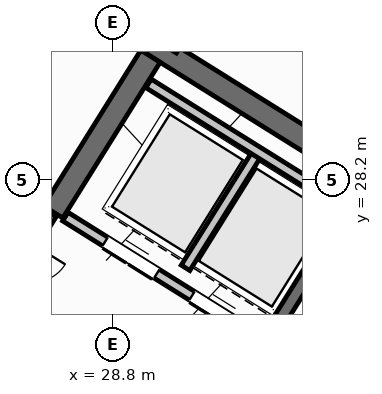
"""IFC4 building model, lengths in metres.
Left out: names, types, materials, properties, quantities, classifications, styles, units other than length and angle.
Written with IfcOpenShell. Run it as: python <this file> out.ifc"""

import sys

from ifc_helpers import new_model, si_unit, direction, frame, frame_2d, origin, origin_2d, place, context, subcontext, project, spatial, rectangle, hollow_rectangle, extrude, source, transform, mapped, element, fill, save


model = new_model("IFC4")
c1 = context("Model", 3, precision=1e-05, world=origin(), true_north=direction((0.0, 1.0)))
c2 = subcontext(c1, "Body", "Model", "MODEL_VIEW")
j1 = project(units=[si_unit("LENGTHUNIT", "METRE"), si_unit("PLANEANGLEUNIT", "RADIAN")], contexts=[c1])
p1 = place(None, origin())
s1 = spatial("IfcSite", under=j1, at=p1, CompositionType="ELEMENT")
p2 = place(p1, origin())
s2 = spatial("IfcBuilding", under=s1, at=p2, CompositionType="ELEMENT")
p3 = place(p2, frame((0.0, 0.0, 225.6)))
s3 = spatial("IfcBuildingStorey", under=s2, at=p3, CompositionType="ELEMENT", Elevation=225.6)
p4 = place(p3, frame((40.531, 24.036, 0.0), z_axis=(0.0, 0.0, 1.0), x_axis=(-0.848048787466, 0.529918157905, 0.0)))
e1 = element("IfcWall", 1, at=p4, inside=s3, PredefinedType="SHEAR", context=c2, shape_type="SweptSolid", body=[
    extrude(rectangle(XDim=13.04, YDim=0.45, at=frame_2d((6.52, 0.0))), origin(), (0.0, 0.0, 1.0), 3.35),
])
p5 = place(p3, frame((29.544, 30.636, 0.0), z_axis=(0.0, 0.0, 1.0), x_axis=(-0.529902075036, -0.848058836916, 0.0)))
e2 = element("IfcWall", 2, at=p5, inside=s3, PredefinedType="SHEAR", context=c2, shape_type="SweptSolid", body=[
    extrude(rectangle(XDim=3.625, YDim=0.45, at=frame_2d((1.812, 0.0))), origin(), (0.0, 0.0, 1.0), 3.35),
])
m1 = source(origin(), c2, "Body", "SweptSolid", [
    extrude(hollow_rectangle(XDim=0.8, YDim=0.8, WallThickness=0.032, at=origin_2d()), origin(), (0.0, 0.0, 1.0), 3.6),
])
p6 = place(p3, frame((29.928, 31.251, 0.0), z_axis=(0.0, 0.0, 1.0), x_axis=(-0.848048096156, 0.529919264233, 0.0)))
e3 = element("IfcColumn", 3, at=p6, inside=s3, PredefinedType="COLUMN", context=c2, shape_type="MappedRepresentation", body=[
    mapped(m1, transform((0.0, 0.0, 0.0), scale=1.0)),
])
p7 = place(p3, frame((31.76, 12.183, 0.0), z_axis=(0.0, 0.0, 1.0), x_axis=(-0.848047074256, 0.529920899612, 0.0)))
e4 = element("IfcWall", 4, at=p7, inside=s3, PredefinedType="STANDARD", context=c2, shape_type="SweptSolid", body=[
    extrude(rectangle(XDim=30.652, YDim=0.32, at=frame_2d((15.326, 0.0))), origin(), (0.0, 0.0, 1.0), 3.35),
])
p8 = place(p7, frame((15.166, 0.0, 0.0)))
e5 = element("IfcOpeningElement", 5, at=p8, cuts=e4, PredefinedType="OPENING", context=c2, shape_type="SweptSolid", body=[
    extrude(rectangle(XDim=1.2, YDim=2.15, at=frame_2d((0.6, 1.075))), frame((0.0, 0.17, 0.0), z_axis=(0.0, -1.0, 0.0), x_axis=(1.0, 0.0, 0.0)), (0.0, 0.0, 1.0), 0.34),
])
p9 = place(p7, frame((2.24, 0.0, 0.9)))
e6 = element("IfcOpeningElement", 6, at=p9, cuts=e4, PredefinedType="OPENING", context=c2, shape_type="SweptSolid", body=[
    extrude(rectangle(XDim=1.65, YDim=1.45, at=frame_2d((0.825, 0.725))), frame((0.0, 0.17, 0.0), z_axis=(0.0, -1.0, 0.0), x_axis=(1.0, 0.0, 0.0)), (0.0, 0.0, 1.0), 0.34),
])
p10 = place(p7, frame((7.469, 0.0, 0.9)))
e7 = element("IfcOpeningElement", 7, at=p10, cuts=e4, PredefinedType="OPENING", context=c2, shape_type="SweptSolid", body=[
    extrude(rectangle(XDim=1.65, YDim=1.45, at=frame_2d((0.825, 0.725))), frame((0.0, 0.17, 0.0), z_axis=(0.0, -1.0, 0.0), x_axis=(1.0, 0.0, 0.0)), (0.0, 0.0, 1.0), 0.34),
])
p11 = place(p7, frame((12.623, 0.0, 1.0)))
e8 = element("IfcOpeningElement", 8, at=p11, cuts=e4, PredefinedType="OPENING", context=c2, shape_type="SweptSolid", body=[
    extrude(rectangle(XDim=0.9, YDim=1.25, at=frame_2d((0.45, 0.625))), frame((0.0, 0.17, 0.0), z_axis=(0.0, -1.0, 0.0), x_axis=(1.0, 0.0, 0.0)), (0.0, 0.0, 1.0), 0.34),
])
p12 = place(p7, frame((19.556, 0.0, 1.0)))
e9 = element("IfcOpeningElement", 9, at=p12, cuts=e4, PredefinedType="OPENING", context=c2, shape_type="SweptSolid", body=[
    extrude(rectangle(XDim=0.9, YDim=1.25, at=frame_2d((0.45, 0.625))), frame((0.0, 0.17, 0.0), z_axis=(0.0, -1.0, 0.0), x_axis=(1.0, 0.0, 0.0)), (0.0, 0.0, 1.0), 0.34),
])
p13 = place(p7, frame((21.95, 0.0, 1.0)))
e10 = element("IfcOpeningElement", 10, at=p13, cuts=e4, PredefinedType="OPENING", context=c2, shape_type="SweptSolid", body=[
    extrude(rectangle(XDim=0.9, YDim=1.25, at=frame_2d((0.45, 0.625))), frame((0.0, 0.17, 0.0), z_axis=(0.0, -1.0, 0.0), x_axis=(1.0, 0.0, 0.0)), (0.0, 0.0, 1.0), 0.34),
])
p14 = place(p7, frame((26.983, 0.0, 0.9)))
e11 = element("IfcOpeningElement", 11, at=p14, cuts=e4, PredefinedType="OPENING", context=c2, shape_type="SweptSolid", body=[
    extrude(rectangle(XDim=1.35, YDim=1.45, at=frame_2d((0.675, 0.725))), frame((0.0, 0.17, 0.0), z_axis=(0.0, -1.0, 0.0), x_axis=(1.0, 0.0, 0.0)), (0.0, 0.0, 1.0), 0.34),
])
p15 = place(p3, frame((33.496, 27.677, 0.0), z_axis=(0.0, 0.0, 1.0), x_axis=(-0.529908658664, -0.84805472316, 0.0)))
e12 = element("IfcWall", 12, at=p15, inside=s3, PredefinedType="SHEAR", context=c2, shape_type="SweptSolid", body=[
    extrude(rectangle(XDim=3.16, YDim=0.26, at=frame_2d((1.58, 0.0))), origin(), (0.0, 0.0, 1.0), 3.35),
])
p16 = place(p3, frame((31.822, 24.998, 0.0), z_axis=(0.0, 0.0, 1.0), x_axis=(-0.848054125777, 0.529909614701, 0.0)))
e13 = element("IfcWall", 13, at=p16, inside=s3, PredefinedType="STANDARD", context=c2, shape_type="SweptSolid", body=[
    extrude(rectangle(XDim=4.668, YDim=0.2, at=frame_2d((2.334, 0.0))), origin(), (0.0, 0.0, 1.0), 3.34),
])
p17 = place(p16, frame((0.52, 0.0, 0.0)))
e14 = element("IfcOpeningElement", 14, at=p17, cuts=e13, PredefinedType="OPENING", context=c2, shape_type="SweptSolid", body=[
    extrude(rectangle(XDim=1.2, YDim=2.15, at=frame_2d((0.6, 1.075))), frame((0.0, 0.11, 0.0), z_axis=(0.0, -1.0, 0.0), x_axis=(1.0, 0.0, 0.0)), (0.0, 0.0, 1.0), 0.22),
])
p18 = place(p16, frame((2.54, 0.0, 0.0)))
e15 = element("IfcOpeningElement", 15, at=p18, cuts=e13, PredefinedType="OPENING", context=c2, shape_type="SweptSolid", body=[
    extrude(rectangle(XDim=1.2, YDim=2.15, at=frame_2d((0.6, 1.075))), frame((0.0, 0.11, 0.0), z_axis=(0.0, -1.0, 0.0), x_axis=(1.0, 0.0, 0.0)), (0.0, 0.0, 1.0), 0.22),
])
p19 = place(p3, frame((31.645, 28.716, 0.0), z_axis=(0.0, 0.0, 1.0), x_axis=(-0.52986693015, -0.848080795876, 0.0)))
e16 = element("IfcWall", 16, at=p19, inside=s3, PredefinedType="STANDARD", context=c2, shape_type="SweptSolid", body=[
    extrude(rectangle(XDim=2.66, YDim=0.2, at=frame_2d((1.33, 0.0))), origin(), (0.0, 0.0, 1.0), 3.34),
])
p20 = place(p3, frame((33.363, 27.69, 0.0), z_axis=(0.0, 0.0, 1.0), x_axis=(-0.84804957148, 0.529916903215, 0.0)))
e17 = element("IfcWall", 17, at=p20, inside=s3, PredefinedType="STANDARD", context=c2, shape_type="SweptSolid", body=[
    extrude(rectangle(XDim=4.548, YDim=0.2, at=frame_2d((2.274, 0.0))), origin(), (0.0, 0.0, 1.0), 3.34),
])
p21 = place(p3, frame((27.596, 27.52, 0.0), z_axis=(0.0, 0.0, 1.0), x_axis=(-0.529865479138, -0.848081702443, 0.0)))
e18 = element("IfcWall", 18, at=p21, inside=s3, PredefinedType="STANDARD", context=c2, shape_type="SweptSolid", body=[
    extrude(rectangle(XDim=2.96, YDim=0.2, at=frame_2d((1.48, 0.0))), origin(), (0.0, 0.0, 1.0), 3.34),
])
p22 = place(p21, frame((0.7, 0.0, 0.0)))
e19 = element("IfcOpeningElement", 19, at=p22, cuts=e18, PredefinedType="OPENING", context=c2, shape_type="SweptSolid", body=[
    extrude(rectangle(XDim=1.5, YDim=2.15, at=frame_2d((0.75, 1.075))), frame((0.0, 0.11, 0.0), z_axis=(0.0, -1.0, 0.0), x_axis=(1.0, 0.0, 0.0)), (0.0, 0.0, 1.0), 0.22),
])
p23 = place(p3, frame((31.239, 38.274, 0.0), z_axis=(0.0, 0.0, 1.0), x_axis=(-0.529921796515, -0.848046513806, 0.0)))
e20 = element("IfcWall", 20, at=p23, inside=s3, PredefinedType="PARTITIONING", context=c2, shape_type="SweptSolid", body=[
    extrude(rectangle(XDim=16.5, YDim=0.16, at=frame_2d((8.25, 0.0))), origin(), (0.0, 0.0, 1.0), 3.34),
])
p24 = place(p3, frame((41.936, 26.012, 0.0), z_axis=(0.0, 0.0, 1.0), x_axis=(-0.848051154596, 0.529914369676, 0.0)))
e21 = element("IfcWall", 21, at=p24, inside=s3, PredefinedType="PARTITIONING", context=c2, shape_type="SweptSolid", body=[
    extrude(rectangle(XDim=15.57, YDim=0.16, at=frame_2d((7.785, 0.0))), origin(), (0.0, 0.0, 1.0), 3.34),
])
p25 = place(p24, frame((10.83, 0.0, 0.0)))
e22 = element("IfcOpeningElement", 22, at=p25, cuts=e21, PredefinedType="OPENING", context=c2, shape_type="SweptSolid", body=[
    extrude(rectangle(XDim=1.0, YDim=2.1, at=frame_2d((0.5, 1.05))), frame((0.0, 0.09, 0.0), z_axis=(0.0, -1.0, 0.0), x_axis=(1.0, 0.0, 0.0)), (0.0, 0.0, 1.0), 0.18),
])
p26 = place(p3, frame((42.226, 28.873, 0.0), z_axis=(0.0, 0.0, 1.0), x_axis=(-0.848049134363, 0.529917602752, 0.0)))
e23 = element("IfcWall", 23, at=p26, inside=s3, PredefinedType="PLUMBINGWALL", context=c2, shape_type="SweptSolid", body=[
    extrude(rectangle(XDim=14.3, YDim=0.14, at=frame_2d((7.15, 0.0))), origin(), (0.0, 0.0, 1.0), 3.34),
])
p27 = place(p26, frame((9.57, 0.0, 0.0)))
e24 = element("IfcOpeningElement", 24, at=p27, cuts=e23, PredefinedType="OPENING", context=c2, shape_type="SweptSolid", body=[
    extrude(rectangle(XDim=0.92, YDim=2.08, at=frame_2d((0.46, 1.04))), frame((0.0, 0.08, 0.0), z_axis=(0.0, -1.0, 0.0), x_axis=(1.0, 0.0, 0.0)), (0.0, 0.0, 1.0), 0.16),
])
m2 = source(origin(), c2, "Body", "SweptSolid", [
    extrude(rectangle(XDim=1.2, YDim=2.15, at=frame_2d((0.6, 1.075))), frame((0.0, 0.025, 0.0), z_axis=(0.0, -1.0, 0.0), x_axis=(1.0, 0.0, 0.0)), (0.0, 0.0, 1.0), 0.05),
])
p28 = place(p17, origin())
e25 = element("IfcDoor", 25, at=p28, inside=s3, OperationType="DOUBLE_DOOR_SLIDING", PredefinedType="DOOR", context=c2, shape_type="MappedRepresentation", body=[
    mapped(m2, transform((0.0, 0.0, 0.0), scale=1.0)),
])
fill(e14, e25)
p29 = place(p18, origin())
e26 = element("IfcDoor", 26, at=p29, inside=s3, OperationType="DOUBLE_DOOR_SLIDING", PredefinedType="DOOR", context=c2, shape_type="MappedRepresentation", body=[
    mapped(m2, transform((0.0, 0.0, 0.0), scale=1.0)),
])
fill(e15, e26)
save(model, sys.argv[1])
